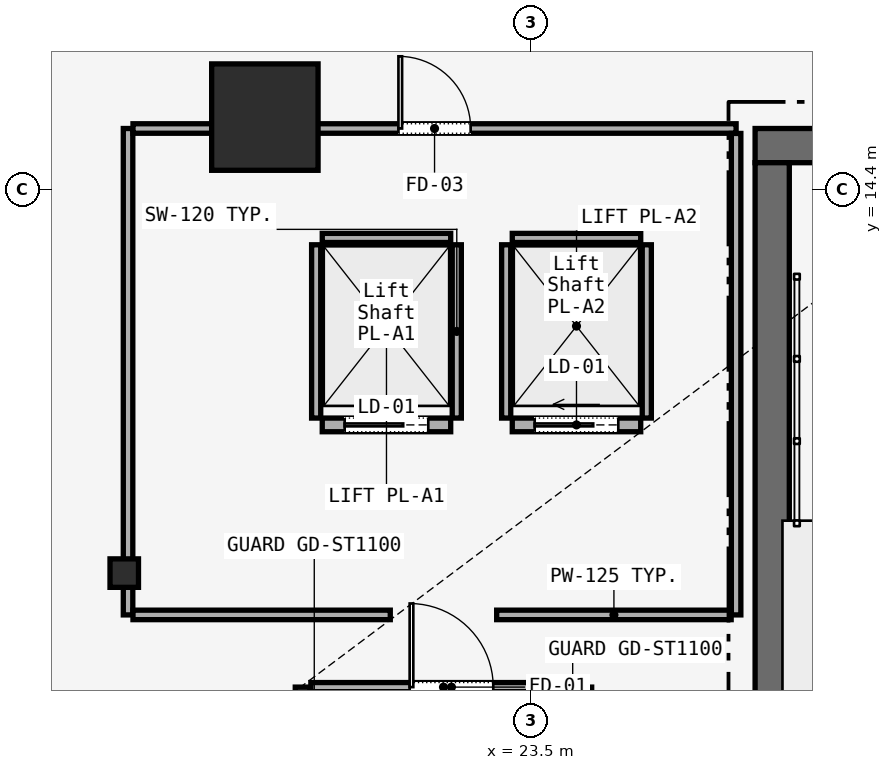
"""IFC4 building model, lengths in metres.
Left out: names, types, materials, properties, quantities, classifications, styles, units other than length and angle.
Written with IfcOpenShell. Run it as: python <this file> out.ifc"""

import sys

from ifc_helpers import new_model, si_unit, direction, frame, frame_2d, origin, origin_2d, place, context, subcontext, project, spatial, rectangle, i_section, extrude, element, fill, save


model = new_model("IFC4")
c1 = context("Model", 3, precision=1e-05, world=origin(), true_north=direction((0.0, 1.0)))
c2 = subcontext(c1, "Body", "Model", "MODEL_VIEW")
j1 = project(units=[si_unit("LENGTHUNIT", "METRE"), si_unit("PLANEANGLEUNIT", "RADIAN")], contexts=[c1])
p1 = place(None, origin())
s1 = spatial("IfcSite", under=j1, at=p1, CompositionType="ELEMENT")
p2 = place(p1, origin())
s2 = spatial("IfcBuilding", under=s1, at=p2, CompositionType="ELEMENT")
p3 = place(p2, frame((0.0, 0.0, -9.0)))
s3 = spatial("IfcBuildingStorey", under=s2, at=p3, CompositionType="ELEMENT", Elevation=-9.0)
p4 = place(p3, frame((26.45, 14.975, 0.0), z_axis=(0.0, 0.0, 1.0), x_axis=(1.0, 0.0, 0.0)))
e1 = element("IfcWall", 1, at=p4, inside=s3, PredefinedType="SOLIDWALL", context=c2, shape_type="SweptSolid", body=[
    extrude(rectangle(XDim=31.1, YDim=0.45, at=frame_2d((15.55, 0.0))), origin(), (0.0, 0.0, 1.0), 4.15),
])
p5 = place(p4, frame((1.65, 0.0, 0.0)))
e2 = element("IfcOpeningElement", 2, at=p5, cuts=e1, PredefinedType="OPENING", context=c2, shape_type="SweptSolid", body=[
    extrude(rectangle(XDim=1.1, YDim=2.2, at=frame_2d((0.55, 1.1))), frame((0.0, 0.225, 0.0), z_axis=(0.0, -1.0, 0.0), x_axis=(1.0, 0.0, 0.0)), (0.0, 0.0, 1.0), 0.45),
])
p6 = place(p4, frame((13.65, 0.0, 0.0)))
e3 = element("IfcOpeningElement", 3, at=p6, cuts=e1, PredefinedType="OPENING", context=c2, shape_type="SweptSolid", body=[
    extrude(rectangle(XDim=1.1, YDim=2.2, at=frame_2d((0.55, 1.1))), frame((0.0, 0.225, 0.0), z_axis=(0.0, -1.0, 0.0), x_axis=(1.0, 0.0, 0.0)), (0.0, 0.0, 1.0), 0.45),
])
p7 = place(p4, frame((25.55, 0.0, 0.0)))
e4 = element("IfcOpeningElement", 4, at=p7, cuts=e1, PredefinedType="OPENING", context=c2, shape_type="SweptSolid", body=[
    extrude(rectangle(XDim=1.1, YDim=2.2, at=frame_2d((0.55, 1.1))), frame((0.0, 0.225, 0.0), z_axis=(0.0, -1.0, 0.0), x_axis=(1.0, 0.0, 0.0)), (0.0, 0.0, 1.0), 0.45),
])
p8 = place(p4, frame((10.7, 0.0, 0.0)))
e5 = element("IfcOpeningElement", 5, at=p8, cuts=e1, PredefinedType="OPENING", context=c2, shape_type="SweptSolid", body=[
    extrude(rectangle(XDim=1.4, YDim=2.2, at=frame_2d((0.7, 1.1))), frame((0.0, 0.225, 0.0), z_axis=(0.0, -1.0, 0.0), x_axis=(1.0, 0.0, 0.0)), (0.0, 0.0, 1.0), 0.45),
])
p9 = place(p4, frame((19.35, 0.0, 0.0)))
e6 = element("IfcOpeningElement", 6, at=p9, cuts=e1, PredefinedType="OPENING", context=c2, shape_type="SweptSolid", body=[
    extrude(rectangle(XDim=1.1, YDim=2.2, at=frame_2d((0.55, 1.1))), frame((0.0, 0.225, 0.0), z_axis=(0.0, -1.0, 0.0), x_axis=(1.0, 0.0, 0.0)), (0.0, 0.0, 1.0), 0.45),
])
p10 = place(p4, frame((21.4, 0.0, 0.0)))
e7 = element("IfcOpeningElement", 7, at=p10, cuts=e1, PredefinedType="OPENING", context=c2, shape_type="SweptSolid", body=[
    extrude(rectangle(XDim=0.9, YDim=2.1, at=frame_2d((0.45, 1.05))), frame((0.0, 0.225, 0.0), z_axis=(0.0, -1.0, 0.0), x_axis=(1.0, 0.0, 0.0)), (0.0, 0.0, 1.0), 0.45),
])
p11 = place(p4, frame((23.35, 0.0, 0.0)))
e8 = element("IfcOpeningElement", 8, at=p11, cuts=e1, PredefinedType="OPENING", context=c2, shape_type="SweptSolid", body=[
    extrude(rectangle(XDim=1.3, YDim=2.3, at=frame_2d((0.65, 1.15))), frame((0.0, 0.225, 0.0), z_axis=(0.0, -1.0, 0.0), x_axis=(1.0, 0.0, 0.0)), (0.0, 0.0, 1.0), 0.45),
])
p12 = place(p3, frame((26.675, 5.85, 0.0), z_axis=(0.0, 0.0, 1.0), x_axis=(0.0, 1.0, 0.0)))
e9 = element("IfcWall", 9, at=p12, inside=s3, PredefinedType="SOLIDWALL", context=c2, shape_type="SweptSolid", body=[
    extrude(rectangle(XDim=8.9, YDim=0.45, at=frame_2d((4.45, 0.0))), origin(), (0.0, 0.0, 1.0), 4.15),
])
p13 = place(p3, frame((20.0, 15.35, 0.0), z_axis=(0.0, 0.0, 1.0), x_axis=(1.0, 0.0, 0.0)))
e10 = element("IfcColumn", 10, at=p13, inside=s3, PredefinedType="COLUMN", context=c2, shape_type="SweptSolid", body=[
    extrude(rectangle(XDim=1.4, YDim=1.4, at=origin_2d()), origin(), (0.0, 0.0, 1.0), 4.15),
])
p14 = place(p3, frame((18.15, 9.35, 0.0), z_axis=(0.0, 0.0, 1.0), x_axis=(1.0, 0.0, 0.0)))
e11 = element("IfcColumn", 11, at=p14, inside=s3, PredefinedType="COLUMN", context=c2, shape_type="SweptSolid", body=[
    extrude(i_section(OverallWidth=0.375, OverallDepth=0.375, WebThickness=0.017, FlangeThickness=0.027, FilletRadius=0.015, at=origin_2d()), origin(), (0.0, 0.0, 1.0), 4.5),
])
for number, where, z_axis, x_axis in (
    (12, (20.5, 7.85, 0.0), (0.0, 0.0, 1.0), (0.0, -1.0, 0.0)),
    (13, (24.2, 7.85, 0.0), (0.0, 0.0, 1.0), (0.0, -1.0, 0.0)),
):
    element("IfcWall", number, at=place(p3, frame(where, z_axis=z_axis, x_axis=x_axis)), inside=s3, PredefinedType="SOLIDWALL", context=c2, shape_type="SweptSolid", body=[
        extrude(rectangle(XDim=6.9, YDim=0.2, at=frame_2d((3.45, 0.0))), origin(), (0.0, 0.0, 1.0), 4.5),
    ])
p15 = place(p3, frame((20.605, 7.85, 0.0), z_axis=(0.0, 0.0, 1.0), x_axis=(1.0, 0.0, 0.0)))
e14 = element("IfcWall", 14, at=p15, inside=s3, PredefinedType="SOLIDWALL", context=c2, shape_type="SweptSolid", body=[
    extrude(rectangle(XDim=3.49, YDim=0.12, at=frame_2d((1.745, 0.0))), origin(), (0.0, 0.0, 1.0), 3.193),
])
p16 = place(p15, frame((1.3, 0.0, 0.0)))
e15 = element("IfcOpeningElement", 15, at=p16, cuts=e14, PredefinedType="OPENING", context=c2, shape_type="SweptSolid", body=[
    extrude(rectangle(XDim=1.1, YDim=2.2, at=frame_2d((0.55, 1.1))), frame((0.0, 0.06, 0.0), z_axis=(0.0, -1.0, 0.0), x_axis=(1.0, 0.0, 0.0)), (0.0, 0.0, 1.0), 0.12),
])
p17 = place(p3, frame((20.755, 11.3, 0.0), z_axis=(0.0, 0.0, 1.0), x_axis=(1.0, 0.0, 0.0)))
e16 = element("IfcWall", 16, at=p17, inside=s3, PredefinedType="SOLIDWALL", context=c2, shape_type="SweptSolid", body=[
    extrude(rectangle(XDim=1.69, YDim=0.18, at=frame_2d((0.845, 0.0))), origin(), (0.0, 0.0, 1.0), 3.193),
])
p18 = place(p17, frame((0.295, 0.0, 0.0)))
e17 = element("IfcOpeningElement", 17, at=p18, cuts=e16, PredefinedType="OPENING", context=c2, shape_type="SweptSolid", body=[
    extrude(rectangle(XDim=1.1, YDim=2.2, at=frame_2d((0.55, 1.1))), frame((0.0, 0.09, 0.0), z_axis=(0.0, -1.0, 0.0), x_axis=(1.0, 0.0, 0.0)), (0.0, 0.0, 1.0), 0.18),
])
p19 = place(p3, frame((20.755, 13.76, 0.0), z_axis=(0.0, 0.0, 1.0), x_axis=(1.0, 0.0, 0.0)))
e18 = element("IfcWall", 18, at=p19, inside=s3, PredefinedType="SOLIDWALL", context=c2, shape_type="SweptSolid", body=[
    extrude(rectangle(XDim=1.69, YDim=0.12, at=frame_2d((0.845, 0.0))), origin(), (0.0, 0.0, 1.0), 3.193),
])
for number, where, z_axis, x_axis in (
    (19, (20.675, 11.39, 0.0), (0.0, 0.0, 1.0), (0.0, 1.0, 0.0)),
    (20, (22.525, 11.39, 0.0), (0.0, 0.0, 1.0), (0.0, 1.0, 0.0)),
):
    element("IfcWall", number, at=place(p3, frame(where, z_axis=z_axis, x_axis=x_axis)), inside=s3, PredefinedType="SOLIDWALL", context=c2, shape_type="SweptSolid", body=[
        extrude(rectangle(XDim=2.28, YDim=0.12, at=frame_2d((1.14, 0.0))), origin(), (0.0, 0.0, 1.0), 3.193),
    ])
p20 = place(p3, frame((23.255, 11.3, 0.0), z_axis=(0.0, 0.0, 1.0), x_axis=(1.0, 0.0, 0.0)))
e21 = element("IfcWall", 21, at=p20, inside=s3, PredefinedType="SOLIDWALL", context=c2, shape_type="SweptSolid", body=[
    extrude(rectangle(XDim=1.69, YDim=0.18, at=frame_2d((0.845, 0.0))), origin(), (0.0, 0.0, 1.0), 3.193),
])
p21 = place(p20, frame((0.295, 0.0, 0.0)))
e22 = element("IfcOpeningElement", 22, at=p21, cuts=e21, PredefinedType="OPENING", context=c2, shape_type="SweptSolid", body=[
    extrude(rectangle(XDim=1.1, YDim=2.2, at=frame_2d((0.55, 1.1))), frame((0.0, 0.09, 0.0), z_axis=(0.0, -1.0, 0.0), x_axis=(1.0, 0.0, 0.0)), (0.0, 0.0, 1.0), 0.18),
])
p22 = place(p3, frame((23.255, 13.76, 0.0), z_axis=(0.0, 0.0, 1.0), x_axis=(1.0, 0.0, 0.0)))
e23 = element("IfcWall", 23, at=p22, inside=s3, PredefinedType="SOLIDWALL", context=c2, shape_type="SweptSolid", body=[
    extrude(rectangle(XDim=1.69, YDim=0.12, at=frame_2d((0.845, 0.0))), origin(), (0.0, 0.0, 1.0), 3.193),
])
for number, where, z_axis, x_axis in (
    (24, (23.175, 11.39, 0.0), (0.0, 0.0, 1.0), (0.0, 1.0, 0.0)),
    (25, (25.025, 11.39, 0.0), (0.0, 0.0, 1.0), (0.0, 1.0, 0.0)),
):
    element("IfcWall", number, at=place(p3, frame(where, z_axis=z_axis, x_axis=x_axis)), inside=s3, PredefinedType="SOLIDWALL", context=c2, shape_type="SweptSolid", body=[
        extrude(rectangle(XDim=2.28, YDim=0.12, at=frame_2d((1.14, 0.0))), origin(), (0.0, 0.0, 1.0), 3.193),
    ])
p23 = place(p3, frame((18.2, 8.8, 0.0), z_axis=(0.0, 0.0, 1.0), x_axis=(0.0, 1.0, 0.0)))
e26 = element("IfcWall", 26, at=p23, inside=s3, PredefinedType="PARTITIONING", context=c2, shape_type="SweptSolid", body=[
    extrude(rectangle(XDim=6.4, YDim=0.125, at=frame_2d((3.2, 0.0))), origin(), (0.0, 0.0, 1.0), 3.193),
])
p24 = place(p3, frame((18.265, 15.2, 0.0), z_axis=(0.0, 0.0, 1.0), x_axis=(1.0, 0.0, 0.0)))
e27 = element("IfcWall", 27, at=p24, inside=s3, PredefinedType="PARTITIONING", context=c2, shape_type="SweptSolid", body=[
    extrude(rectangle(XDim=7.935, YDim=0.125, at=frame_2d((3.968, 0.0))), origin(), (0.0, 0.0, 1.0), 3.193),
])
p25 = place(p24, frame((3.492, 0.0, 0.0)))
e28 = element("IfcOpeningElement", 28, at=p25, cuts=e27, PredefinedType="OPENING", context=c2, shape_type="SweptSolid", body=[
    extrude(rectangle(XDim=0.95, YDim=2.2, at=frame_2d((0.475, 1.1))), frame((0.0, 0.062, 0.0), z_axis=(0.0, -1.0, 0.0), x_axis=(1.0, 0.0, 0.0)), (0.0, 0.0, 1.0), 0.125),
])
p26 = place(p3, frame((26.2, 15.135, 0.0), z_axis=(0.0, 0.0, 1.0), x_axis=(0.0, -1.0, 0.0)))
e29 = element("IfcWall", 29, at=p26, inside=s3, PredefinedType="PARTITIONING", context=c2, shape_type="SweptSolid", body=[
    extrude(rectangle(XDim=6.335, YDim=0.125, at=frame_2d((3.167, 0.0))), origin(), (0.0, 0.0, 1.0), 3.193),
])
p27 = place(p3, frame((26.135, 8.8, 0.0), z_axis=(0.0, 0.0, 1.0), x_axis=(-1.0, 0.0, 0.0)))
e30 = element("IfcWall", 30, at=p27, inside=s3, PredefinedType="PARTITIONING", context=c2, shape_type="SweptSolid", body=[
    extrude(rectangle(XDim=3.085, YDim=0.125, at=frame_2d((1.542, 0.0))), origin(), (0.0, 0.0, 1.0), 3.193),
])
p28 = place(p3, frame((21.65, 8.8, 0.0), z_axis=(0.0, 0.0, 1.0), x_axis=(-1.0, 0.0, 0.0)))
e31 = element("IfcWall", 31, at=p28, inside=s3, PredefinedType="PARTITIONING", context=c2, shape_type="SweptSolid", body=[
    extrude(rectangle(XDim=3.385, YDim=0.125, at=frame_2d((1.692, 0.0))), origin(), (0.0, 0.0, 1.0), 3.193),
])
p29 = place(p16, origin())
e32 = element("IfcDoor", 32, at=p29, inside=s3, OperationType="SINGLE_SWING_LEFT", PredefinedType="DOOR", context=c2, shape_type="SweptSolid", body=[
    extrude(rectangle(XDim=1.1, YDim=2.2, at=frame_2d((0.55, 1.1))), frame((0.0, 0.025, 0.0), z_axis=(0.0, -1.0, 0.0), x_axis=(1.0, 0.0, 0.0)), (0.0, 0.0, 1.0), 0.05),
])
fill(e15, e32)
p30 = place(p18, origin())
e33 = element("IfcDoor", 33, at=p30, inside=s3, OperationType="SLIDING_TO_LEFT", PredefinedType="DOOR", context=c2, shape_type="SweptSolid", body=[
    extrude(rectangle(XDim=1.1, YDim=2.2, at=frame_2d((0.55, 1.1))), frame((0.0, 0.025, 0.0), z_axis=(0.0, -1.0, 0.0), x_axis=(1.0, 0.0, 0.0)), (0.0, 0.0, 1.0), 0.05),
])
fill(e17, e33)
p31 = place(p21, origin())
e34 = element("IfcDoor", 34, at=p31, inside=s3, OperationType="SLIDING_TO_LEFT", PredefinedType="DOOR", context=c2, shape_type="SweptSolid", body=[
    extrude(rectangle(XDim=1.1, YDim=2.2, at=frame_2d((0.55, 1.1))), frame((0.0, 0.025, 0.0), z_axis=(0.0, -1.0, 0.0), x_axis=(1.0, 0.0, 0.0)), (0.0, 0.0, 1.0), 0.05),
])
fill(e22, e34)
p32 = place(p25, origin())
e35 = element("IfcDoor", 35, at=p32, inside=s3, OperationType="SINGLE_SWING_RIGHT", PredefinedType="DOOR", context=c2, shape_type="SweptSolid", body=[
    extrude(rectangle(XDim=0.95, YDim=2.2, at=frame_2d((0.475, 1.1))), frame((0.0, 0.025, 0.0), z_axis=(0.0, -1.0, 0.0), x_axis=(1.0, 0.0, 0.0)), (0.0, 0.0, 1.0), 0.05),
])
fill(e28, e35)
save(model, sys.argv[1])
